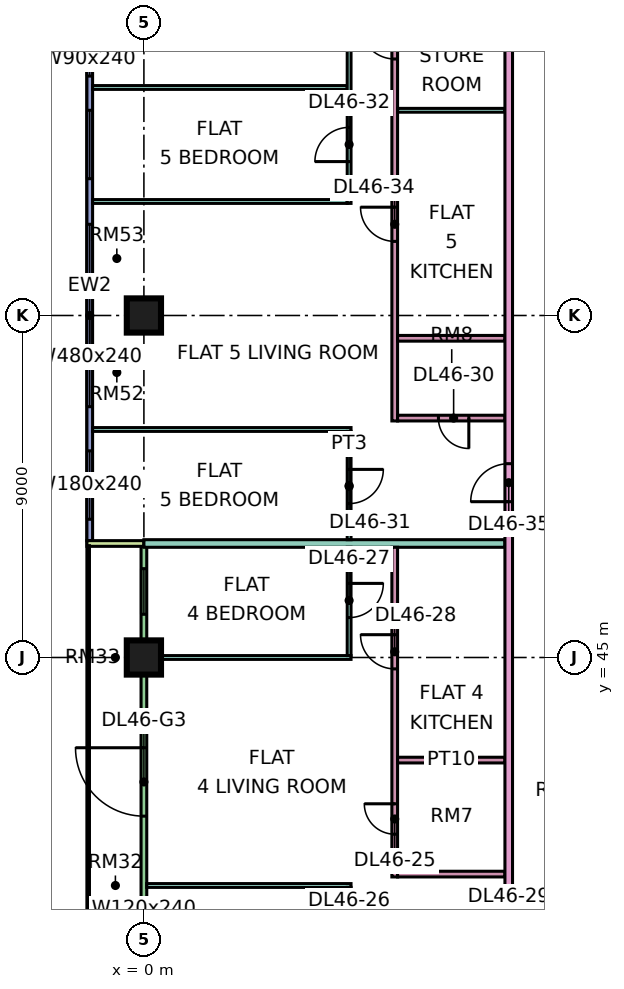
"""IFC4 building model, lengths in metres.
Left out: names, types, materials, properties, quantities, classifications, styles, units other than length and angle.
Written with IfcOpenShell. Run it as: python <this file> out.ifc"""

import sys

from ifc_helpers import new_model, si_unit, direction, frame, frame_2d, origin, origin_2d, place, context, subcontext, project, spatial, rectangle, extrude, element, fill, save


model = new_model("IFC4")
c1 = context("Model", 3, precision=1e-05, world=origin(), true_north=direction((0.0, 1.0)))
c2 = subcontext(c1, "Body", "Model", "MODEL_VIEW")
j1 = project(units=[si_unit("LENGTHUNIT", "METRE"), si_unit("PLANEANGLEUNIT", "RADIAN")], contexts=[c1])
p1 = place(None, origin())
s1 = spatial("IfcSite", under=j1, at=p1, CompositionType="ELEMENT")
p2 = place(p1, origin())
s2 = spatial("IfcBuilding", under=s1, at=p2, CompositionType="ELEMENT")
p3 = place(p2, frame((0.0, 0.0, 198.65)))
s3 = spatial("IfcBuildingStorey", under=s2, at=p3, CompositionType="ELEMENT", Elevation=198.65)
for number, where, z_axis, x_axis in (
    (1, (0.0, 45.0, 0.0), (0.0, 0.0, 1.0), (1.0, 0.0, 0.0)),
    (2, (0.0, 54.0, 0.0), (0.0, 0.0, 1.0), (1.0, 0.0, 0.0)),
):
    element("IfcColumn", number, at=place(p3, frame(where, z_axis=z_axis, x_axis=x_axis)), inside=s3, PredefinedType="COLUMN", context=c2, shape_type="SweptSolid", body=[
        extrude(rectangle(XDim=0.9, YDim=0.9, at=origin_2d()), origin(), (0.0, 0.0, 1.0), 3.75),
    ])
p4 = place(p3, frame((-1.425, 61.5, 0.0), z_axis=(0.0, 0.0, 1.0), x_axis=(0.0, -1.0, 0.0)))
e3 = element("IfcWall", 3, at=p4, inside=s3, PredefinedType="SOLIDWALL", context=c2, shape_type="SweptSolid", body=[
    extrude(rectangle(XDim=13.425, YDim=0.15, at=frame_2d((6.712, 0.0))), origin(), (0.0, 0.0, 1.0), 3.35),
])
p5 = place(p4, frame((0.3, 0.0, 0.45)))
e4 = element("IfcOpeningElement", 4, at=p5, cuts=e3, PredefinedType="OPENING", context=c2, shape_type="SweptSolid", body=[
    extrude(rectangle(XDim=0.9, YDim=2.4, at=frame_2d((0.45, 1.2))), frame((0.0, 0.085, 0.0), z_axis=(0.0, -1.0, 0.0), x_axis=(1.0, 0.0, 0.0)), (0.0, 0.0, 1.0), 0.17),
])
p6 = place(p4, frame((2.1, 0.0, 0.45)))
e5 = element("IfcOpeningElement", 5, at=p6, cuts=e3, PredefinedType="OPENING", context=c2, shape_type="SweptSolid", body=[
    extrude(rectangle(XDim=1.8, YDim=2.4, at=frame_2d((0.9, 1.2))), frame((0.0, 0.085, 0.0), z_axis=(0.0, -1.0, 0.0), x_axis=(1.0, 0.0, 0.0)), (0.0, 0.0, 1.0), 0.17),
])
p7 = place(p4, frame((5.1, 0.0, 0.45)))
e6 = element("IfcOpeningElement", 6, at=p7, cuts=e3, PredefinedType="OPENING", context=c2, shape_type="SweptSolid", body=[
    extrude(rectangle(XDim=4.8, YDim=2.4, at=frame_2d((2.4, 1.2))), frame((0.0, 0.085, 0.0), z_axis=(0.0, -1.0, 0.0), x_axis=(1.0, 0.0, 0.0)), (0.0, 0.0, 1.0), 0.17),
])
p8 = place(p4, frame((11.062, 0.0, 0.45)))
e7 = element("IfcOpeningElement", 7, at=p8, cuts=e3, PredefinedType="OPENING", context=c2, shape_type="SweptSolid", body=[
    extrude(rectangle(XDim=1.8, YDim=2.4, at=frame_2d((0.9, 1.2))), frame((0.0, 0.085, 0.0), z_axis=(0.0, -1.0, 0.0), x_axis=(1.0, 0.0, 0.0)), (0.0, 0.0, 1.0), 0.17),
])
p9 = place(p3, frame((0.0, 47.925, 0.0), z_axis=(0.0, 0.0, 1.0), x_axis=(0.0, -1.0, 0.0)))
e8 = element("IfcWall", 8, at=p9, inside=s3, PredefinedType="SOLIDWALL", context=c2, shape_type="SweptSolid", body=[
    extrude(rectangle(XDim=11.85, YDim=0.15, at=frame_2d((5.925, 0.0))), origin(), (0.0, 0.0, 1.0), 3.35),
])
p10 = place(p9, frame((0.587, 0.0, 0.45)))
e9 = element("IfcOpeningElement", 9, at=p10, cuts=e8, PredefinedType="OPENING", context=c2, shape_type="SweptSolid", body=[
    extrude(rectangle(XDim=1.2, YDim=2.4, at=frame_2d((0.6, 1.2))), frame((0.0, 0.085, 0.0), z_axis=(0.0, -1.0, 0.0), x_axis=(1.0, 0.0, 0.0)), (0.0, 0.0, 1.0), 0.17),
])
p11 = place(p9, frame((5.3, 0.0, 0.0)))
e10 = element("IfcOpeningElement", 10, at=p11, cuts=e8, PredefinedType="OPENING", context=c2, shape_type="SweptSolid", body=[
    extrude(rectangle(XDim=1.8, YDim=2.4, at=frame_2d((0.9, 1.2))), frame((0.0, 0.085, 0.0), z_axis=(0.0, -1.0, 0.0), x_axis=(1.0, 0.0, 0.0)), (0.0, 0.0, 1.0), 0.17),
])
p12 = place(p9, frame((9.55, 0.0, 0.45)))
e11 = element("IfcOpeningElement", 11, at=p12, cuts=e8, PredefinedType="OPENING", context=c2, shape_type="SweptSolid", body=[
    extrude(rectangle(XDim=1.2, YDim=2.4, at=frame_2d((0.6, 1.2))), frame((0.0, 0.085, 0.0), z_axis=(0.0, -1.0, 0.0), x_axis=(1.0, 0.0, 0.0)), (0.0, 0.0, 1.0), 0.17),
])
p13 = place(p3, frame((-1.5, 48.0, 0.0), z_axis=(0.0, 0.0, 1.0), x_axis=(1.0, 0.0, 0.0)))
e12 = element("IfcWall", 12, at=p13, inside=s3, PredefinedType="SOLIDWALL", context=c2, shape_type="SweptSolid", body=[
    extrude(rectangle(XDim=1.5, YDim=0.15, at=frame_2d((0.75, 0.0))), origin(), (0.0, 0.0, 1.0), 3.35),
])
p14 = place(p3, frame((-1.351, 60.0, 0.0), z_axis=(0.0, 0.0, 1.0), x_axis=(1.0, 0.0, 0.0)))
e13 = element("IfcWall", 13, at=p14, inside=s3, PredefinedType="PARTITIONING", context=c2, shape_type="SweptSolid", body=[
    extrude(rectangle(XDim=6.701, YDim=0.1, at=frame_2d((3.351, 0.0))), origin(), (0.0, 0.0, 1.0), 3.35),
])
p15 = place(p3, frame((0.0, 48.0, 0.0), z_axis=(0.0, 0.0, 1.0), x_axis=(1.0, 0.0, 0.0)))
e14 = element("IfcWall", 14, at=p15, inside=s3, PredefinedType="PARTITIONING", context=c2, shape_type="SweptSolid", body=[
    extrude(rectangle(XDim=9.5, YDim=0.2, at=frame_2d((4.75, 0.0))), origin(), (0.0, 0.0, 1.0), 3.35),
])
p16 = place(p3, frame((-1.35, 51.0, 0.0), z_axis=(0.0, 0.0, 1.0), x_axis=(1.0, 0.0, 0.0)))
e15 = element("IfcWall", 15, at=p16, inside=s3, PredefinedType="PARTITIONING", context=c2, shape_type="SweptSolid", body=[
    extrude(rectangle(XDim=6.8, YDim=0.1, at=frame_2d((3.4, 0.0))), origin(), (0.0, 0.0, 1.0), 3.35),
])
p17 = place(p3, frame((-1.35, 57.0, 0.0), z_axis=(0.0, 0.0, 1.0), x_axis=(1.0, 0.0, 0.0)))
e16 = element("IfcWall", 16, at=p17, inside=s3, PredefinedType="PARTITIONING", context=c2, shape_type="SweptSolid", body=[
    extrude(rectangle(XDim=6.7, YDim=0.1, at=frame_2d((3.35, 0.0))), origin(), (0.0, 0.0, 1.0), 3.35),
])
for number, where, z_axis, x_axis in (
    (17, (0.074, 39.0, 0.0), (0.0, 0.0, 1.0), (1.0, 0.0, 0.0)),
    (18, (0.074, 45.0, 0.0), (0.0, 0.0, 1.0), (1.0, 0.0, 0.0)),
):
    element("IfcWall", number, at=place(p3, frame(where, z_axis=z_axis, x_axis=x_axis)), inside=s3, PredefinedType="PARTITIONING", context=c2, shape_type="SweptSolid", body=[
        extrude(rectangle(XDim=5.376, YDim=0.1, at=frame_2d((2.688, 0.0))), origin(), (0.0, 0.0, 1.0), 3.35),
    ])
p18 = place(p3, frame((5.4, 36.1, 0.0), z_axis=(0.0, 0.0, 1.0), x_axis=(0.0, 1.0, 0.0)))
e19 = element("IfcWall", 19, at=p18, inside=s3, PredefinedType="PARTITIONING", context=c2, shape_type="SweptSolid", body=[
    extrude(rectangle(XDim=2.85, YDim=0.1, at=frame_2d((1.425, 0.0))), origin(), (0.0, 0.0, 1.0), 3.35),
])
p19 = place(p18, frame((0.95, 0.0, 0.0)))
e20 = element("IfcOpeningElement", 20, at=p19, cuts=e19, PredefinedType="OPENING", context=c2, shape_type="SweptSolid", body=[
    extrude(rectangle(XDim=0.9, YDim=2.1, at=frame_2d((0.45, 1.05))), frame((0.0, 0.06, 0.0), z_axis=(0.0, -1.0, 0.0), x_axis=(1.0, 0.0, 0.0)), (0.0, 0.0, 1.0), 0.12),
])
p20 = place(p3, frame((5.4, 45.05, 0.0), z_axis=(0.0, 0.0, 1.0), x_axis=(0.0, 1.0, 0.0)))
e21 = element("IfcWall", 21, at=p20, inside=s3, PredefinedType="PARTITIONING", context=c2, shape_type="SweptSolid", body=[
    extrude(rectangle(XDim=2.85, YDim=0.1, at=frame_2d((1.425, 0.0))), origin(), (0.0, 0.0, 1.0), 3.35),
])
p21 = place(p20, frame((1.0, 0.0, 0.0)))
e22 = element("IfcOpeningElement", 22, at=p21, cuts=e21, PredefinedType="OPENING", context=c2, shape_type="SweptSolid", body=[
    extrude(rectangle(XDim=0.9, YDim=2.1, at=frame_2d((0.45, 1.05))), frame((0.0, 0.06, 0.0), z_axis=(0.0, -1.0, 0.0), x_axis=(1.0, 0.0, 0.0)), (0.0, 0.0, 1.0), 0.12),
])
p22 = place(p3, frame((5.4, 48.1, 0.0), z_axis=(0.0, 0.0, 1.0), x_axis=(0.0, 1.0, 0.0)))
e23 = element("IfcWall", 23, at=p22, inside=s3, PredefinedType="PARTITIONING", context=c2, shape_type="SweptSolid", body=[
    extrude(rectangle(XDim=2.85, YDim=0.1, at=frame_2d((1.425, 0.0))), origin(), (0.0, 0.0, 1.0), 3.35),
])
p23 = place(p22, frame((0.95, 0.0, 0.0)))
e24 = element("IfcOpeningElement", 24, at=p23, cuts=e23, PredefinedType="OPENING", context=c2, shape_type="SweptSolid", body=[
    extrude(rectangle(XDim=0.9, YDim=2.1, at=frame_2d((0.45, 1.05))), frame((0.0, 0.06, 0.0), z_axis=(0.0, -1.0, 0.0), x_axis=(1.0, 0.0, 0.0)), (0.0, 0.0, 1.0), 0.12),
])
p24 = place(p3, frame((5.4, 56.95, 0.0), z_axis=(0.0, 0.0, 1.0), x_axis=(0.0, 1.0, 0.0)))
e25 = element("IfcWall", 25, at=p24, inside=s3, PredefinedType="PARTITIONING", context=c2, shape_type="SweptSolid", body=[
    extrude(rectangle(XDim=6.1, YDim=0.1, at=frame_2d((3.05, 0.0))), origin(), (0.0, 0.0, 1.0), 3.35),
])
p25 = place(p24, frame((1.1, 0.0, 0.0)))
e26 = element("IfcOpeningElement", 26, at=p25, cuts=e25, PredefinedType="OPENING", context=c2, shape_type="SweptSolid", body=[
    extrude(rectangle(XDim=0.9, YDim=2.1, at=frame_2d((0.45, 1.05))), frame((0.0, 0.06, 0.0), z_axis=(0.0, -1.0, 0.0), x_axis=(1.0, 0.0, 0.0)), (0.0, 0.0, 1.0), 0.12),
])
p26 = place(p24, frame((4.1, 0.0, 0.0)))
e27 = element("IfcOpeningElement", 27, at=p26, cuts=e25, PredefinedType="OPENING", context=c2, shape_type="SweptSolid", body=[
    extrude(rectangle(XDim=0.9, YDim=2.1, at=frame_2d((0.45, 1.05))), frame((0.0, 0.06, 0.0), z_axis=(0.0, -1.0, 0.0), x_axis=(1.0, 0.0, 0.0)), (0.0, 0.0, 1.0), 0.12),
])
p27 = place(p3, frame((6.6, 39.225, 0.0), z_axis=(0.0, 0.0, 1.0), x_axis=(0.0, 1.0, 0.0)))
e28 = element("IfcWall", 28, at=p27, inside=s3, PredefinedType="PARTITIONING", context=c2, shape_type="SweptSolid", body=[
    extrude(rectangle(XDim=8.675, YDim=0.15, at=frame_2d((4.337, 0.0))), origin(), (0.0, 0.0, 1.0), 3.35),
])
p28 = place(p27, frame((1.125, 0.0, 0.0)))
e29 = element("IfcOpeningElement", 29, at=p28, cuts=e28, PredefinedType="OPENING", context=c2, shape_type="SweptSolid", body=[
    extrude(rectangle(XDim=0.8, YDim=2.1, at=frame_2d((0.4, 1.05))), frame((0.0, 0.085, 0.0), z_axis=(0.0, -1.0, 0.0), x_axis=(1.0, 0.0, 0.0)), (0.0, 0.0, 1.0), 0.17),
])
p29 = place(p27, frame((5.475, 0.0, 0.0)))
e30 = element("IfcOpeningElement", 30, at=p29, cuts=e28, PredefinedType="OPENING", context=c2, shape_type="SweptSolid", body=[
    extrude(rectangle(XDim=0.9, YDim=2.1, at=frame_2d((0.45, 1.05))), frame((0.0, 0.085, 0.0), z_axis=(0.0, -1.0, 0.0), x_axis=(1.0, 0.0, 0.0)), (0.0, 0.0, 1.0), 0.17),
])
p30 = place(p3, frame((6.6, 51.225, 0.0), z_axis=(0.0, 0.0, 1.0), x_axis=(0.0, 1.0, 0.0)))
e31 = element("IfcWall", 31, at=p30, inside=s3, PredefinedType="PARTITIONING", context=c2, shape_type="SweptSolid", body=[
    extrude(rectangle(XDim=13.125, YDim=0.15, at=frame_2d((6.562, 0.0))), origin(), (0.0, 0.0, 1.0), 3.35),
])
p31 = place(p30, frame((4.725, 0.0, 0.0)))
e32 = element("IfcOpeningElement", 32, at=p31, cuts=e31, PredefinedType="OPENING", context=c2, shape_type="SweptSolid", body=[
    extrude(rectangle(XDim=0.9, YDim=2.1, at=frame_2d((0.45, 1.05))), frame((0.0, 0.085, 0.0), z_axis=(0.0, -1.0, 0.0), x_axis=(1.0, 0.0, 0.0)), (0.0, 0.0, 1.0), 0.17),
])
p32 = place(p30, frame((9.525, 0.0, 0.0)))
e33 = element("IfcOpeningElement", 33, at=p32, cuts=e31, PredefinedType="OPENING", context=c2, shape_type="SweptSolid", body=[
    extrude(rectangle(XDim=0.9, YDim=2.1, at=frame_2d((0.45, 1.05))), frame((0.0, 0.085, 0.0), z_axis=(0.0, -1.0, 0.0), x_axis=(1.0, 0.0, 0.0)), (0.0, 0.0, 1.0), 0.17),
])
for number, where, z_axis, x_axis in (
    (34, (6.675, 39.3, 0.0), (0.0, 0.0, 1.0), (1.0, 0.0, 0.0)),
    (35, (6.675, 42.3, 0.0), (0.0, 0.0, 1.0), (1.0, 0.0, 0.0)),
):
    element("IfcWall", number, at=place(p3, frame(where, z_axis=z_axis, x_axis=x_axis)), inside=s3, PredefinedType="PARTITIONING", context=c2, shape_type="SweptSolid", body=[
        extrude(rectangle(XDim=2.825, YDim=0.15, at=frame_2d((1.413, 0.0))), origin(), (0.0, 0.0, 1.0), 3.35),
    ])
p33 = place(p3, frame((6.675, 51.3, 0.0), z_axis=(0.0, 0.0, 1.0), x_axis=(1.0, 0.0, 0.0)))
e36 = element("IfcWall", 36, at=p33, inside=s3, PredefinedType="PARTITIONING", context=c2, shape_type="SweptSolid", body=[
    extrude(rectangle(XDim=2.825, YDim=0.15, at=frame_2d((1.413, 0.0))), origin(), (0.0, 0.0, 1.0), 3.35),
])
p34 = place(p33, frame((1.075, 0.0, 0.0)))
e37 = element("IfcOpeningElement", 37, at=p34, cuts=e36, PredefinedType="OPENING", context=c2, shape_type="SweptSolid", body=[
    extrude(rectangle(XDim=0.8, YDim=2.1, at=frame_2d((0.4, 1.05))), frame((0.0, 0.085, 0.0), z_axis=(0.0, -1.0, 0.0), x_axis=(1.0, 0.0, 0.0)), (0.0, 0.0, 1.0), 0.17),
])
p35 = place(p3, frame((6.675, 53.4, 0.0), z_axis=(0.0, 0.0, 1.0), x_axis=(1.0, 0.0, 0.0)))
e38 = element("IfcWall", 38, at=p35, inside=s3, PredefinedType="PARTITIONING", context=c2, shape_type="SweptSolid", body=[
    extrude(rectangle(XDim=2.825, YDim=0.15, at=frame_2d((1.413, 0.0))), origin(), (0.0, 0.0, 1.0), 3.35),
])
p36 = place(p3, frame((6.675, 59.4, 0.0), z_axis=(0.0, 0.0, 1.0), x_axis=(1.0, 0.0, 0.0)))
e39 = element("IfcWall", 39, at=p36, inside=s3, PredefinedType="PARTITIONING", context=c2, shape_type="SweptSolid", body=[
    extrude(rectangle(XDim=2.825, YDim=0.1, at=frame_2d((1.413, 0.0))), origin(), (0.0, 0.0, 1.0), 3.35),
])
p37 = place(p3, frame((9.6, 20.0, 0.0), z_axis=(0.0, 0.0, 1.0), x_axis=(0.0, 1.0, 0.0)))
e40 = element("IfcWall", 40, at=p37, inside=s3, PredefinedType="PARTITIONING", context=c2, shape_type="SweptSolid", body=[
    extrude(rectangle(XDim=44.35, YDim=0.2, at=frame_2d((22.175, 0.0))), origin(), (0.0, 0.0, 1.0), 3.35),
])
p38 = place(p37, frame((17.1, 0.0, 0.0)))
e41 = element("IfcOpeningElement", 41, at=p38, cuts=e40, PredefinedType="OPENING", context=c2, shape_type="SweptSolid", body=[
    extrude(rectangle(XDim=1.0, YDim=2.1, at=frame_2d((0.5, 1.05))), frame((0.0, 0.11, 0.0), z_axis=(0.0, -1.0, 0.0), x_axis=(1.0, 0.0, 0.0)), (0.0, 0.0, 1.0), 0.22),
])
p39 = place(p37, frame((29.1, 0.0, 0.0)))
e42 = element("IfcOpeningElement", 42, at=p39, cuts=e40, PredefinedType="OPENING", context=c2, shape_type="SweptSolid", body=[
    extrude(rectangle(XDim=1.0, YDim=2.1, at=frame_2d((0.5, 1.05))), frame((0.0, 0.11, 0.0), z_axis=(0.0, -1.0, 0.0), x_axis=(1.0, 0.0, 0.0)), (0.0, 0.0, 1.0), 0.22),
])
p40 = place(p37, frame((0.6, 0.0, 0.0)))
e43 = element("IfcOpeningElement", 43, at=p40, cuts=e40, PredefinedType="OPENING", context=c2, shape_type="SweptSolid", body=[
    extrude(rectangle(XDim=1.2, YDim=2.1, at=frame_2d((0.6, 1.05))), frame((0.0, 0.11, 0.0), z_axis=(0.0, -1.0, 0.0), x_axis=(1.0, 0.0, 0.0)), (0.0, 0.0, 1.0), 0.22),
])
p41 = place(p37, frame((4.35, 0.0, 0.0)))
e44 = element("IfcOpeningElement", 44, at=p41, cuts=e40, PredefinedType="OPENING", context=c2, shape_type="SweptSolid", body=[
    extrude(rectangle(XDim=1.0, YDim=2.1, at=frame_2d((0.5, 1.05))), frame((0.0, 0.11, 0.0), z_axis=(0.0, -1.0, 0.0), x_axis=(1.0, 0.0, 0.0)), (0.0, 0.0, 1.0), 0.22),
])
p42 = place(p5, origin())
e45 = element("IfcWindow", 45, at=p42, inside=s3, PartitioningType="SINGLE_PANEL", PredefinedType="WINDOW", context=c2, shape_type="SweptSolid", body=[
    extrude(rectangle(XDim=0.9, YDim=2.4, at=frame_2d((0.45, 1.2))), frame((0.0, 0.03, 0.0), z_axis=(0.0, -1.0, 0.0), x_axis=(1.0, 0.0, 0.0)), (0.0, 0.0, 1.0), 0.06),
])
fill(e4, e45)
p43 = place(p6, origin())
e46 = element("IfcWindow", 46, at=p43, inside=s3, PartitioningType="SINGLE_PANEL", PredefinedType="WINDOW", context=c2, shape_type="SweptSolid", body=[
    extrude(rectangle(XDim=1.8, YDim=2.4, at=frame_2d((0.9, 1.2))), frame((0.0, 0.03, 0.0), z_axis=(0.0, -1.0, 0.0), x_axis=(1.0, 0.0, 0.0)), (0.0, 0.0, 1.0), 0.06),
])
fill(e5, e46)
p44 = place(p7, origin())
e47 = element("IfcWindow", 47, at=p44, inside=s3, PartitioningType="SINGLE_PANEL", PredefinedType="WINDOW", context=c2, shape_type="SweptSolid", body=[
    extrude(rectangle(XDim=4.8, YDim=2.4, at=frame_2d((2.4, 1.2))), frame((0.0, 0.03, 0.0), z_axis=(0.0, -1.0, 0.0), x_axis=(1.0, 0.0, 0.0)), (0.0, 0.0, 1.0), 0.06),
])
fill(e6, e47)
p45 = place(p8, origin())
e48 = element("IfcWindow", 48, at=p45, inside=s3, PartitioningType="SINGLE_PANEL", PredefinedType="WINDOW", context=c2, shape_type="SweptSolid", body=[
    extrude(rectangle(XDim=1.8, YDim=2.4, at=frame_2d((0.9, 1.2))), frame((0.0, 0.03, 0.0), z_axis=(0.0, -1.0, 0.0), x_axis=(1.0, 0.0, 0.0)), (0.0, 0.0, 1.0), 0.06),
])
fill(e7, e48)
p46 = place(p10, origin())
e49 = element("IfcWindow", 49, at=p46, inside=s3, PartitioningType="SINGLE_PANEL", PredefinedType="WINDOW", context=c2, shape_type="SweptSolid", body=[
    extrude(rectangle(XDim=1.2, YDim=2.4, at=frame_2d((0.6, 1.2))), frame((0.0, 0.03, 0.0), z_axis=(0.0, -1.0, 0.0), x_axis=(1.0, 0.0, 0.0)), (0.0, 0.0, 1.0), 0.06),
])
fill(e9, e49)
p47 = place(p11, frame((1.8, 0.0, 0.0), z_axis=(0.0, 0.0, 1.0), x_axis=(-1.0, 0.0, 0.0)))
e50 = element("IfcDoor", 50, at=p47, inside=s3, OperationType="DOUBLE_DOOR_SINGLE_SWING", PredefinedType="DOOR", context=c2, shape_type="SweptSolid", body=[
    extrude(rectangle(XDim=1.8, YDim=2.4, at=frame_2d((0.9, 1.2))), frame((0.0, 0.025, 0.0), z_axis=(0.0, -1.0, 0.0), x_axis=(1.0, 0.0, 0.0)), (0.0, 0.0, 1.0), 0.05),
])
fill(e10, e50)
p48 = place(p28, frame((0.8, 0.0, 0.0), z_axis=(0.0, 0.0, 1.0), x_axis=(-1.0, 0.0, 0.0)))
e51 = element("IfcDoor", 51, at=p48, inside=s3, OperationType="SINGLE_SWING_RIGHT", PredefinedType="DOOR", context=c2, shape_type="SweptSolid", body=[
    extrude(rectangle(XDim=0.8, YDim=2.1, at=frame_2d((0.4, 1.05))), frame((0.0, 0.025, 0.0), z_axis=(0.0, -1.0, 0.0), x_axis=(1.0, 0.0, 0.0)), (0.0, 0.0, 1.0), 0.05),
])
fill(e29, e51)
p49 = place(p21, origin())
e52 = element("IfcDoor", 52, at=p49, inside=s3, OperationType="SINGLE_SWING_RIGHT", PredefinedType="DOOR", context=c2, shape_type="SweptSolid", body=[
    extrude(rectangle(XDim=0.9, YDim=2.1, at=frame_2d((0.45, 1.05))), frame((0.0, 0.025, 0.0), z_axis=(0.0, -1.0, 0.0), x_axis=(1.0, 0.0, 0.0)), (0.0, 0.0, 1.0), 0.05),
])
fill(e22, e52)
p50 = place(p29, frame((0.9, 0.0, 0.0), z_axis=(0.0, 0.0, 1.0), x_axis=(-1.0, 0.0, 0.0)))
e53 = element("IfcDoor", 53, at=p50, inside=s3, OperationType="SINGLE_SWING_RIGHT", PredefinedType="DOOR", context=c2, shape_type="SweptSolid", body=[
    extrude(rectangle(XDim=0.9, YDim=2.1, at=frame_2d((0.45, 1.05))), frame((0.0, 0.025, 0.0), z_axis=(0.0, -1.0, 0.0), x_axis=(1.0, 0.0, 0.0)), (0.0, 0.0, 1.0), 0.05),
])
fill(e30, e53)
p51 = place(p34, origin())
e54 = element("IfcDoor", 54, at=p51, inside=s3, OperationType="SINGLE_SWING_RIGHT", PredefinedType="DOOR", context=c2, shape_type="SweptSolid", body=[
    extrude(rectangle(XDim=0.8, YDim=2.1, at=frame_2d((0.4, 1.05))), frame((0.0, 0.025, 0.0), z_axis=(0.0, -1.0, 0.0), x_axis=(1.0, 0.0, 0.0)), (0.0, 0.0, 1.0), 0.05),
])
fill(e37, e54)
p52 = place(p23, origin())
e55 = element("IfcDoor", 55, at=p52, inside=s3, OperationType="SINGLE_SWING_RIGHT", PredefinedType="DOOR", context=c2, shape_type="SweptSolid", body=[
    extrude(rectangle(XDim=0.9, YDim=2.1, at=frame_2d((0.45, 1.05))), frame((0.0, 0.025, 0.0), z_axis=(0.0, -1.0, 0.0), x_axis=(1.0, 0.0, 0.0)), (0.0, 0.0, 1.0), 0.05),
])
fill(e24, e55)
p53 = place(p25, origin())
e56 = element("IfcDoor", 56, at=p53, inside=s3, OperationType="SINGLE_SWING_LEFT", PredefinedType="DOOR", context=c2, shape_type="SweptSolid", body=[
    extrude(rectangle(XDim=0.9, YDim=2.1, at=frame_2d((0.45, 1.05))), frame((0.0, 0.025, 0.0), z_axis=(0.0, -1.0, 0.0), x_axis=(1.0, 0.0, 0.0)), (0.0, 0.0, 1.0), 0.05),
])
fill(e26, e56)
p54 = place(p31, frame((0.9, 0.0, 0.0), z_axis=(0.0, 0.0, 1.0), x_axis=(-1.0, 0.0, 0.0)))
e57 = element("IfcDoor", 57, at=p54, inside=s3, OperationType="SINGLE_SWING_RIGHT", PredefinedType="DOOR", context=c2, shape_type="SweptSolid", body=[
    extrude(rectangle(XDim=0.9, YDim=2.1, at=frame_2d((0.45, 1.05))), frame((0.0, 0.025, 0.0), z_axis=(0.0, -1.0, 0.0), x_axis=(1.0, 0.0, 0.0)), (0.0, 0.0, 1.0), 0.05),
])
fill(e32, e57)
p55 = place(p39, origin())
e58 = element("IfcDoor", 58, at=p55, inside=s3, OperationType="SINGLE_SWING_LEFT", PredefinedType="DOOR", context=c2, shape_type="SweptSolid", body=[
    extrude(rectangle(XDim=1.0, YDim=2.1, at=frame_2d((0.5, 1.05))), frame((0.0, 0.025, 0.0), z_axis=(0.0, -1.0, 0.0), x_axis=(1.0, 0.0, 0.0)), (0.0, 0.0, 1.0), 0.05),
])
fill(e42, e58)
p56 = place(p32, frame((0.9, 0.0, 0.0), z_axis=(0.0, 0.0, 1.0), x_axis=(-1.0, 0.0, 0.0)))
e59 = element("IfcDoor", 59, at=p56, inside=s3, OperationType="SINGLE_SWING_RIGHT", PredefinedType="DOOR", context=c2, shape_type="SweptSolid", body=[
    extrude(rectangle(XDim=0.9, YDim=2.1, at=frame_2d((0.45, 1.05))), frame((0.0, 0.025, 0.0), z_axis=(0.0, -1.0, 0.0), x_axis=(1.0, 0.0, 0.0)), (0.0, 0.0, 1.0), 0.05),
])
fill(e33, e59)
save(model, sys.argv[1])
